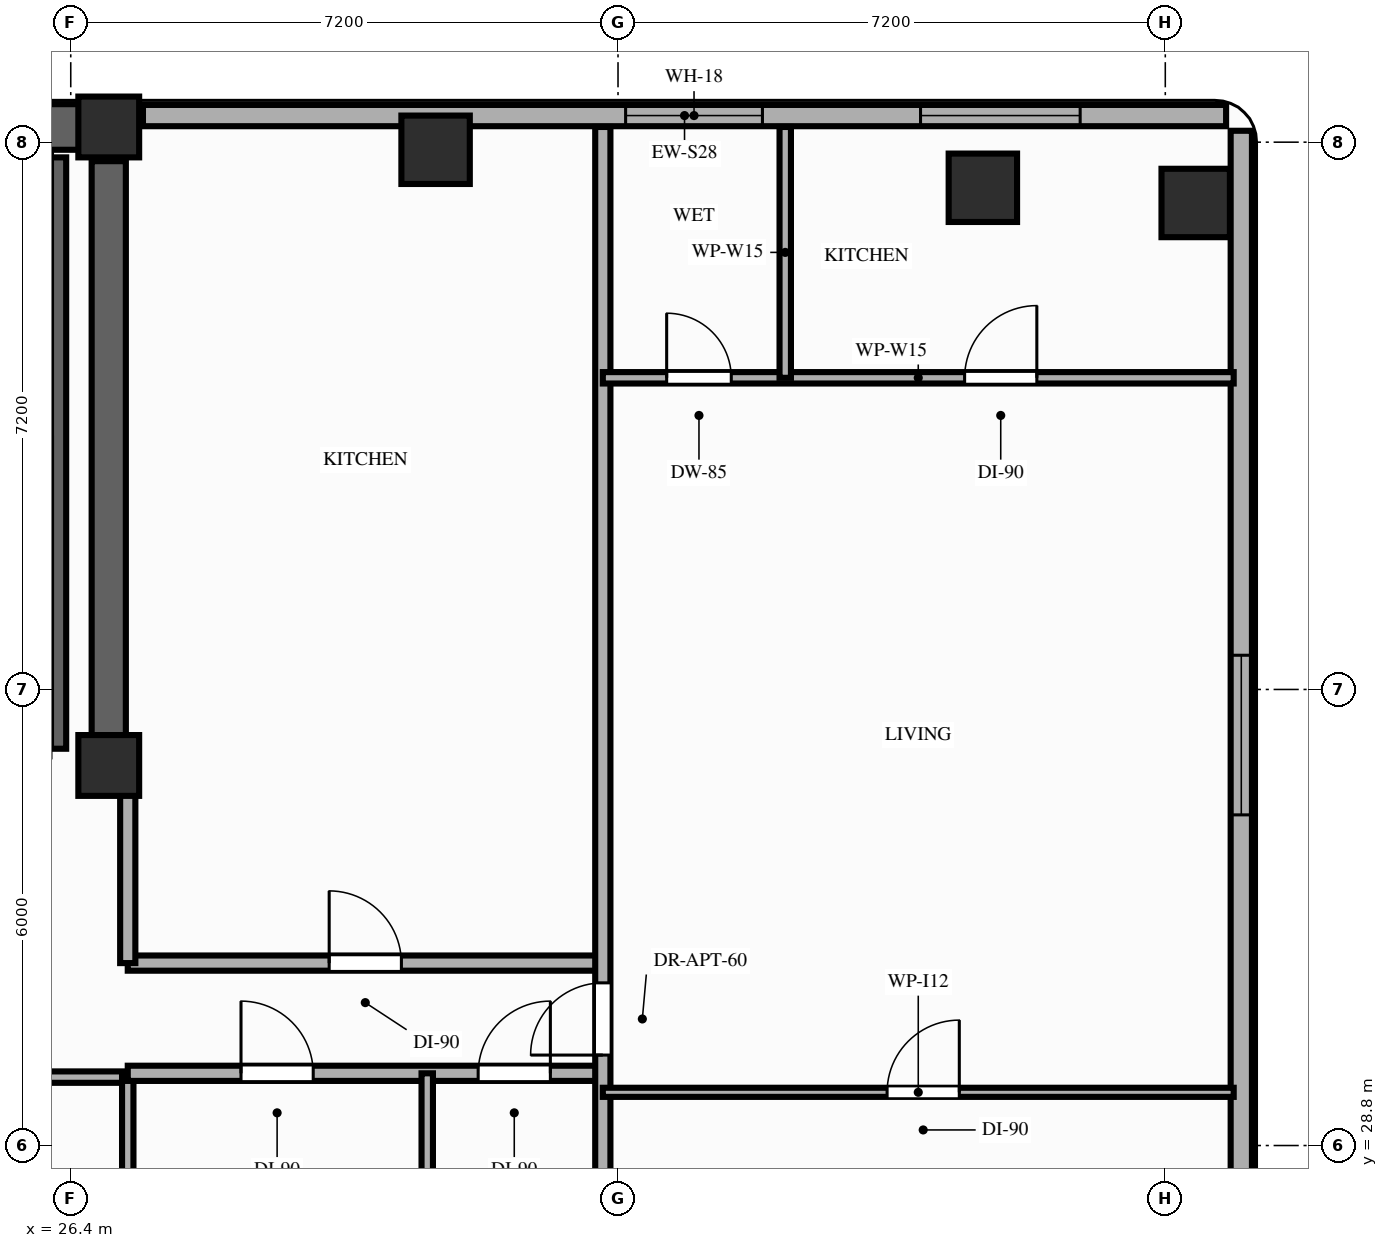
"""IFC4 building model, lengths in metres.
Left out: names, types, materials, properties, quantities, classifications, styles, units other than length and angle.
Written with IfcOpenShell. Run it as: python <this file> out.ifc"""

import sys

from ifc_helpers import new_model, si_unit, direction, frame, frame_2d, origin, origin_2d, place, context, subcontext, project, spatial, rectangle, extrude, element, fill, save


model = new_model("IFC4")
c1 = context("Model", 3, precision=1e-05, world=origin(), true_north=direction((0.0, 1.0)))
c2 = subcontext(c1, "Body", "Model", "MODEL_VIEW")
j1 = project(units=[si_unit("LENGTHUNIT", "METRE"), si_unit("PLANEANGLEUNIT", "RADIAN")], contexts=[c1])
p1 = place(None, origin())
s1 = spatial("IfcSite", under=j1, at=p1, CompositionType="ELEMENT")
p2 = place(p1, origin())
s2 = spatial("IfcBuilding", under=s1, at=p2, CompositionType="ELEMENT")
p3 = place(p2, frame((0.0, 0.0, 195.2)))
s3 = spatial("IfcBuildingStorey", under=s2, at=p3, CompositionType="ELEMENT", Elevation=195.2)
for number, where, z_axis, x_axis in (
    (1, (26.9, 33.8, 0.0), (0.0, 0.0, 1.0), (1.0, 0.0, 0.0)),
    (2, (26.9, 42.2, 0.0), (0.0, 0.0, 1.0), (1.0, 0.0, 0.0)),
):
    element("IfcColumn", number, at=place(p3, frame(where, z_axis=z_axis, x_axis=x_axis)), inside=s3, PredefinedType="COLUMN", context=c2, shape_type="SweptSolid", body=[
        extrude(rectangle(XDim=0.8, YDim=0.8, at=origin_2d()), origin(), (0.0, 0.0, 1.0), 3.2),
    ])
for number, where, z_axis, x_axis in (
    (3, (31.2, 41.9, 0.0), (0.0, 0.0, 1.0), (1.0, 0.0, 0.0)),
    (4, (38.4, 41.4, 0.0), (0.0, 0.0, 1.0), (1.0, 0.0, 0.0)),
    (5, (41.2, 41.2, 0.0), (0.0, 0.0, 1.0), (1.0, 0.0, 0.0)),
):
    element("IfcColumn", number, at=place(p3, frame(where, z_axis=z_axis, x_axis=x_axis)), inside=s3, PredefinedType="COLUMN", context=c2, shape_type="SweptSolid", body=[
        extrude(rectangle(XDim=0.9, YDim=0.9, at=origin_2d()), origin(), (0.0, 0.0, 1.0), 3.2),
    ])
p4 = place(p3, frame((41.6, 42.35, 0.0), z_axis=(0.0, 0.0, 1.0), x_axis=(-1.0, 0.0, 0.0)))
e6 = element("IfcWall", 6, at=p4, inside=s3, PredefinedType="STANDARD", context=c2, shape_type="SweptSolid", body=[
    extrude(rectangle(XDim=14.25, YDim=0.28, at=frame_2d((7.125, 0.0))), origin(), (0.0, 0.0, 1.0), 2.51),
])
p5 = place(p4, frame((6.1, 0.0, 0.85)))
e7 = element("IfcOpeningElement", 7, at=p5, cuts=e6, PredefinedType="OPENING", context=c2, shape_type="SweptSolid", body=[
    extrude(rectangle(XDim=1.8, YDim=1.41, at=frame_2d((0.9, 0.705))), frame((0.0, 0.15, 0.0), z_axis=(0.0, -1.0, 0.0), x_axis=(1.0, 0.0, 0.0)), (0.0, 0.0, 1.0), 0.3),
])
p6 = place(p4, frame((1.92, 0.0, 0.85)))
e8 = element("IfcOpeningElement", 8, at=p6, cuts=e6, PredefinedType="OPENING", context=c2, shape_type="SweptSolid", body=[
    extrude(rectangle(XDim=2.1, YDim=1.41, at=frame_2d((1.05, 0.705))), frame((0.0, 0.15, 0.0), z_axis=(0.0, -1.0, 0.0), x_axis=(1.0, 0.0, 0.0)), (0.0, 0.0, 1.0), 0.3),
])
p7 = place(p3, frame((41.8, 26.8, 0.0), z_axis=(0.0, 0.0, 1.0), x_axis=(0.0, 1.0, 0.0)))
e9 = element("IfcWall", 9, at=p7, inside=s3, PredefinedType="STANDARD", context=c2, shape_type="SweptSolid", body=[
    extrude(rectangle(XDim=15.35, YDim=0.28, at=frame_2d((7.675, 0.0))), origin(), (0.0, 0.0, 1.0), 3.02),
])
p8 = place(p7, frame((6.35, 0.0, 0.85)))
e10 = element("IfcOpeningElement", 10, at=p8, cuts=e9, PredefinedType="OPENING", context=c2, shape_type="SweptSolid", body=[
    extrude(rectangle(XDim=2.1, YDim=1.8, at=frame_2d((1.05, 0.9))), frame((0.0, 0.15, 0.0), z_axis=(0.0, -1.0, 0.0), x_axis=(1.0, 0.0, 0.0)), (0.0, 0.0, 1.0), 0.3),
])
p9 = place(p3, frame((6.45, 42.2, 0.0), z_axis=(0.0, 0.0, 1.0), x_axis=(1.0, 0.0, 0.0)))
e11 = element("IfcWall", 11, at=p9, inside=s3, PredefinedType="SHEAR", context=c2, shape_type="SweptSolid", body=[
    extrude(rectangle(XDim=20.45, YDim=0.6, at=frame_2d((10.225, 0.0))), origin(), (0.0, 0.0, 1.0), 3.02),
])
p10 = place(p3, frame((26.9, 33.8, 0.0), z_axis=(0.0, 0.0, 1.0), x_axis=(0.0, 1.0, 0.0)))
e12 = element("IfcWall", 12, at=p10, inside=s3, PredefinedType="SHEAR", context=c2, shape_type="SweptSolid", body=[
    extrude(rectangle(XDim=7.95, YDim=0.45, at=frame_2d((3.975, 0.0))), origin(), (0.0, 0.0, 1.0), 3.02),
])
p11 = place(p3, frame((26.24, 34.02, 0.0), z_axis=(0.0, 0.0, 1.0), x_axis=(0.0, 1.0, 0.0)))
e13 = element("IfcWall", 13, at=p11, inside=s3, PredefinedType="SHEAR", context=c2, shape_type="SweptSolid", body=[
    extrude(rectangle(XDim=7.78, YDim=0.2, at=frame_2d((3.89, 0.0))), origin(), (0.0, 0.0, 1.0), 3.02),
])
p12 = place(p3, frame((20.45, 29.7, 0.0), z_axis=(0.0, 0.0, 1.0), x_axis=(1.0, 0.0, 0.0)))
e14 = element("IfcWall", 14, at=p12, inside=s3, PredefinedType="PARTITIONING", context=c2, shape_type="SweptSolid", body=[
    extrude(rectangle(XDim=6.7, YDim=0.15, at=frame_2d((3.35, 0.0))), origin(), (0.0, 0.0, 1.0), 3.02),
])
p13 = place(p12, frame((2.8, 0.0, 0.0)))
e15 = element("IfcOpeningElement", 15, at=p13, cuts=e14, PredefinedType="OPENING", context=c2, shape_type="SweptSolid", body=[
    extrude(rectangle(XDim=0.95, YDim=2.15, at=frame_2d((0.475, 1.075))), frame((0.0, 0.085, 0.0), z_axis=(0.0, -1.0, 0.0), x_axis=(1.0, 0.0, 0.0)), (0.0, 0.0, 1.0), 0.17),
])
p14 = place(p3, frame((27.15, 26.75, 0.0), z_axis=(0.0, 0.0, 1.0), x_axis=(0.0, 1.0, 0.0)))
e16 = element("IfcWall", 16, at=p14, inside=s3, PredefinedType="PARTITIONING", context=c2, shape_type="SweptSolid", body=[
    extrude(rectangle(XDim=3.0, YDim=0.15, at=frame_2d((1.5, 0.0))), origin(), (0.0, 0.0, 1.0), 2.51),
])
p15 = place(p3, frame((27.15, 29.75, 0.0), z_axis=(0.0, 0.0, 1.0), x_axis=(1.0, 0.0, 0.0)))
e17 = element("IfcWall", 17, at=p15, inside=s3, PredefinedType="PARTITIONING", context=c2, shape_type="SweptSolid", body=[
    extrude(rectangle(XDim=6.25, YDim=0.2, at=frame_2d((3.125, 0.0))), origin(), (0.0, 0.0, 1.0), 2.51),
])
p16 = place(p15, frame((1.49, 0.0, 0.0)))
e18 = element("IfcOpeningElement", 18, at=p16, cuts=e17, PredefinedType="OPENING", context=c2, shape_type="SweptSolid", body=[
    extrude(rectangle(XDim=0.95, YDim=2.15, at=frame_2d((0.475, 1.075))), frame((0.0, 0.11, 0.0), z_axis=(0.0, -1.0, 0.0), x_axis=(1.0, 0.0, 0.0)), (0.0, 0.0, 1.0), 0.22),
])
p17 = place(p15, frame((4.61, 0.0, 0.0)))
e19 = element("IfcOpeningElement", 19, at=p17, cuts=e17, PredefinedType="OPENING", context=c2, shape_type="SweptSolid", body=[
    extrude(rectangle(XDim=0.95, YDim=2.15, at=frame_2d((0.475, 1.075))), frame((0.0, 0.11, 0.0), z_axis=(0.0, -1.0, 0.0), x_axis=(1.0, 0.0, 0.0)), (0.0, 0.0, 1.0), 0.22),
])
p18 = place(p3, frame((27.15, 31.2, 0.0), z_axis=(0.0, 0.0, 1.0), x_axis=(1.0, 0.0, 0.0)))
e20 = element("IfcWall", 20, at=p18, inside=s3, PredefinedType="PARTITIONING", context=c2, shape_type="SweptSolid", body=[
    extrude(rectangle(XDim=6.25, YDim=0.2, at=frame_2d((3.125, 0.0))), origin(), (0.0, 0.0, 1.0), 2.51),
])
p19 = place(p18, frame((2.65, 0.0, 0.0)))
e21 = element("IfcOpeningElement", 21, at=p19, cuts=e20, PredefinedType="OPENING", context=c2, shape_type="SweptSolid", body=[
    extrude(rectangle(XDim=0.95, YDim=2.15, at=frame_2d((0.475, 1.075))), frame((0.0, 0.11, 0.0), z_axis=(0.0, -1.0, 0.0), x_axis=(1.0, 0.0, 0.0)), (0.0, 0.0, 1.0), 0.22),
])
p20 = place(p3, frame((27.15, 31.2, 0.0), z_axis=(0.0, 0.0, 1.0), x_axis=(0.0, 1.0, 0.0)))
e22 = element("IfcWall", 22, at=p20, inside=s3, PredefinedType="PARTITIONING", context=c2, shape_type="SweptSolid", body=[
    extrude(rectangle(XDim=2.48, YDim=0.2, at=frame_2d((1.24, 0.0))), origin(), (0.0, 0.0, 1.0), 2.51),
])
p21 = place(p3, frame((33.4, 26.75, 0.0), z_axis=(0.0, 0.0, 1.0), x_axis=(0.0, 1.0, 0.0)))
e23 = element("IfcWall", 23, at=p21, inside=s3, PredefinedType="PARTITIONING", context=c2, shape_type="SweptSolid", body=[
    extrude(rectangle(XDim=15.45, YDim=0.2, at=frame_2d((7.725, 0.0))), origin(), (0.0, 0.0, 1.0), 2.51),
])
p22 = place(p21, frame((3.24, 0.0, 0.0)))
e24 = element("IfcOpeningElement", 24, at=p22, cuts=e23, PredefinedType="OPENING", context=c2, shape_type="SweptSolid", body=[
    extrude(rectangle(XDim=0.95, YDim=2.15, at=frame_2d((0.475, 1.075))), frame((0.0, 0.11, 0.0), z_axis=(0.0, -1.0, 0.0), x_axis=(1.0, 0.0, 0.0)), (0.0, 0.0, 1.0), 0.22),
])
p23 = place(p3, frame((33.4, 29.5, 0.0), z_axis=(0.0, 0.0, 1.0), x_axis=(1.0, 0.0, 0.0)))
e25 = element("IfcWall", 25, at=p23, inside=s3, PredefinedType="PARTITIONING", context=c2, shape_type="SweptSolid", body=[
    extrude(rectangle(XDim=8.3, YDim=0.12, at=frame_2d((4.15, 0.0))), origin(), (0.0, 0.0, 1.0), 2.51),
])
p24 = place(p23, frame((3.74, 0.0, 0.0)))
e26 = element("IfcOpeningElement", 26, at=p24, cuts=e25, PredefinedType="OPENING", context=c2, shape_type="SweptSolid", body=[
    extrude(rectangle(XDim=0.95, YDim=2.15, at=frame_2d((0.475, 1.075))), frame((0.0, 0.07, 0.0), z_axis=(0.0, -1.0, 0.0), x_axis=(1.0, 0.0, 0.0)), (0.0, 0.0, 1.0), 0.14),
])
p25 = place(p3, frame((33.4, 38.9, 0.0), z_axis=(0.0, 0.0, 1.0), x_axis=(1.0, 0.0, 0.0)))
e27 = element("IfcWall", 27, at=p25, inside=s3, PredefinedType="PARTITIONING", context=c2, shape_type="SweptSolid", body=[
    extrude(rectangle(XDim=8.3, YDim=0.15, at=frame_2d((4.15, 0.0))), origin(), (0.0, 0.0, 1.0), 2.51),
])
p26 = place(p25, frame((0.84, 0.0, 0.0)))
e28 = element("IfcOpeningElement", 28, at=p26, cuts=e27, PredefinedType="OPENING", context=c2, shape_type="SweptSolid", body=[
    extrude(rectangle(XDim=0.85, YDim=2.1, at=frame_2d((0.425, 1.05))), frame((0.0, 0.085, 0.0), z_axis=(0.0, -1.0, 0.0), x_axis=(1.0, 0.0, 0.0)), (0.0, 0.0, 1.0), 0.17),
])
p27 = place(p25, frame((4.76, 0.0, 0.0)))
e29 = element("IfcOpeningElement", 29, at=p27, cuts=e27, PredefinedType="OPENING", context=c2, shape_type="SweptSolid", body=[
    extrude(rectangle(XDim=0.95, YDim=2.15, at=frame_2d((0.475, 1.075))), frame((0.0, 0.085, 0.0), z_axis=(0.0, -1.0, 0.0), x_axis=(1.0, 0.0, 0.0)), (0.0, 0.0, 1.0), 0.17),
])
p28 = place(p3, frame((35.8, 38.9, 0.0), z_axis=(0.0, 0.0, 1.0), x_axis=(0.0, 1.0, 0.0)))
e30 = element("IfcWall", 30, at=p28, inside=s3, PredefinedType="PARTITIONING", context=c2, shape_type="SweptSolid", body=[
    extrude(rectangle(XDim=3.3, YDim=0.15, at=frame_2d((1.65, 0.0))), origin(), (0.0, 0.0, 1.0), 2.51),
])
p29 = place(p3, frame((31.09, 26.75, 0.0), z_axis=(0.0, 0.0, 1.0), x_axis=(0.0, 1.0, 0.0)))
e31 = element("IfcWall", 31, at=p29, inside=s3, PredefinedType="PARTITIONING", context=c2, shape_type="SweptSolid", body=[
    extrude(rectangle(XDim=3.0, YDim=0.15, at=frame_2d((1.5, 0.0))), origin(), (0.0, 0.0, 1.0), 2.51),
])
p30 = place(p8, origin())
e32 = element("IfcWindow", 32, at=p30, inside=s3, PartitioningType="SINGLE_PANEL", PredefinedType="WINDOW", context=c2, shape_type="SweptSolid", body=[
    extrude(rectangle(XDim=2.1, YDim=1.8, at=frame_2d((1.05, 0.9))), frame((0.0, 0.03, 0.0), z_axis=(0.0, -1.0, 0.0), x_axis=(1.0, 0.0, 0.0)), (0.0, 0.0, 1.0), 0.06),
])
fill(e10, e32)
p31 = place(p5, origin())
e33 = element("IfcWindow", 33, at=p31, inside=s3, PartitioningType="SINGLE_PANEL", PredefinedType="WINDOW", context=c2, shape_type="SweptSolid", body=[
    extrude(rectangle(XDim=1.8, YDim=1.41, at=frame_2d((0.9, 0.705))), frame((0.0, 0.03, 0.0), z_axis=(0.0, -1.0, 0.0), x_axis=(1.0, 0.0, 0.0)), (0.0, 0.0, 1.0), 0.06),
])
fill(e7, e33)
p32 = place(p6, origin())
e34 = element("IfcWindow", 34, at=p32, inside=s3, PartitioningType="SINGLE_PANEL", PredefinedType="WINDOW", context=c2, shape_type="SweptSolid", body=[
    extrude(rectangle(XDim=2.1, YDim=1.41, at=frame_2d((1.05, 0.705))), frame((0.0, 0.03, 0.0), z_axis=(0.0, -1.0, 0.0), x_axis=(1.0, 0.0, 0.0)), (0.0, 0.0, 1.0), 0.06),
])
fill(e8, e34)
p33 = place(p22, origin())
e35 = element("IfcDoor", 35, at=p33, inside=s3, OperationType="SINGLE_SWING_LEFT", PredefinedType="DOOR", context=c2, shape_type="SweptSolid", body=[
    extrude(rectangle(XDim=0.95, YDim=2.15, at=frame_2d((0.475, 1.075))), frame((0.0, 0.025, 0.0), z_axis=(0.0, -1.0, 0.0), x_axis=(1.0, 0.0, 0.0)), (0.0, 0.0, 1.0), 0.05),
])
fill(e24, e35)
p34 = place(p24, origin())
e36 = element("IfcDoor", 36, at=p34, inside=s3, OperationType="SINGLE_SWING_RIGHT", PredefinedType="DOOR", context=c2, shape_type="SweptSolid", body=[
    extrude(rectangle(XDim=0.95, YDim=2.15, at=frame_2d((0.475, 1.075))), frame((0.0, 0.025, 0.0), z_axis=(0.0, -1.0, 0.0), x_axis=(1.0, 0.0, 0.0)), (0.0, 0.0, 1.0), 0.05),
])
fill(e26, e36)
p35 = place(p26, origin())
e37 = element("IfcDoor", 37, at=p35, inside=s3, OperationType="SINGLE_SWING_LEFT", PredefinedType="DOOR", context=c2, shape_type="SweptSolid", body=[
    extrude(rectangle(XDim=0.85, YDim=2.1, at=frame_2d((0.425, 1.05))), frame((0.0, 0.025, 0.0), z_axis=(0.0, -1.0, 0.0), x_axis=(1.0, 0.0, 0.0)), (0.0, 0.0, 1.0), 0.05),
])
fill(e28, e37)
p36 = place(p27, origin())
e38 = element("IfcDoor", 38, at=p36, inside=s3, OperationType="SINGLE_SWING_RIGHT", PredefinedType="DOOR", context=c2, shape_type="SweptSolid", body=[
    extrude(rectangle(XDim=0.95, YDim=2.15, at=frame_2d((0.475, 1.075))), frame((0.0, 0.025, 0.0), z_axis=(0.0, -1.0, 0.0), x_axis=(1.0, 0.0, 0.0)), (0.0, 0.0, 1.0), 0.05),
])
fill(e29, e38)
p37 = place(p16, origin())
e39 = element("IfcDoor", 39, at=p37, inside=s3, OperationType="SINGLE_SWING_LEFT", PredefinedType="DOOR", context=c2, shape_type="SweptSolid", body=[
    extrude(rectangle(XDim=0.95, YDim=2.15, at=frame_2d((0.475, 1.075))), frame((0.0, 0.025, 0.0), z_axis=(0.0, -1.0, 0.0), x_axis=(1.0, 0.0, 0.0)), (0.0, 0.0, 1.0), 0.05),
])
fill(e18, e39)
p38 = place(p17, origin())
e40 = element("IfcDoor", 40, at=p38, inside=s3, OperationType="SINGLE_SWING_RIGHT", PredefinedType="DOOR", context=c2, shape_type="SweptSolid", body=[
    extrude(rectangle(XDim=0.95, YDim=2.15, at=frame_2d((0.475, 1.075))), frame((0.0, 0.025, 0.0), z_axis=(0.0, -1.0, 0.0), x_axis=(1.0, 0.0, 0.0)), (0.0, 0.0, 1.0), 0.05),
])
fill(e19, e40)
p39 = place(p19, origin())
e41 = element("IfcDoor", 41, at=p39, inside=s3, OperationType="SINGLE_SWING_LEFT", PredefinedType="DOOR", context=c2, shape_type="SweptSolid", body=[
    extrude(rectangle(XDim=0.95, YDim=2.15, at=frame_2d((0.475, 1.075))), frame((0.0, 0.025, 0.0), z_axis=(0.0, -1.0, 0.0), x_axis=(1.0, 0.0, 0.0)), (0.0, 0.0, 1.0), 0.05),
])
fill(e21, e41)
save(model, sys.argv[1])
